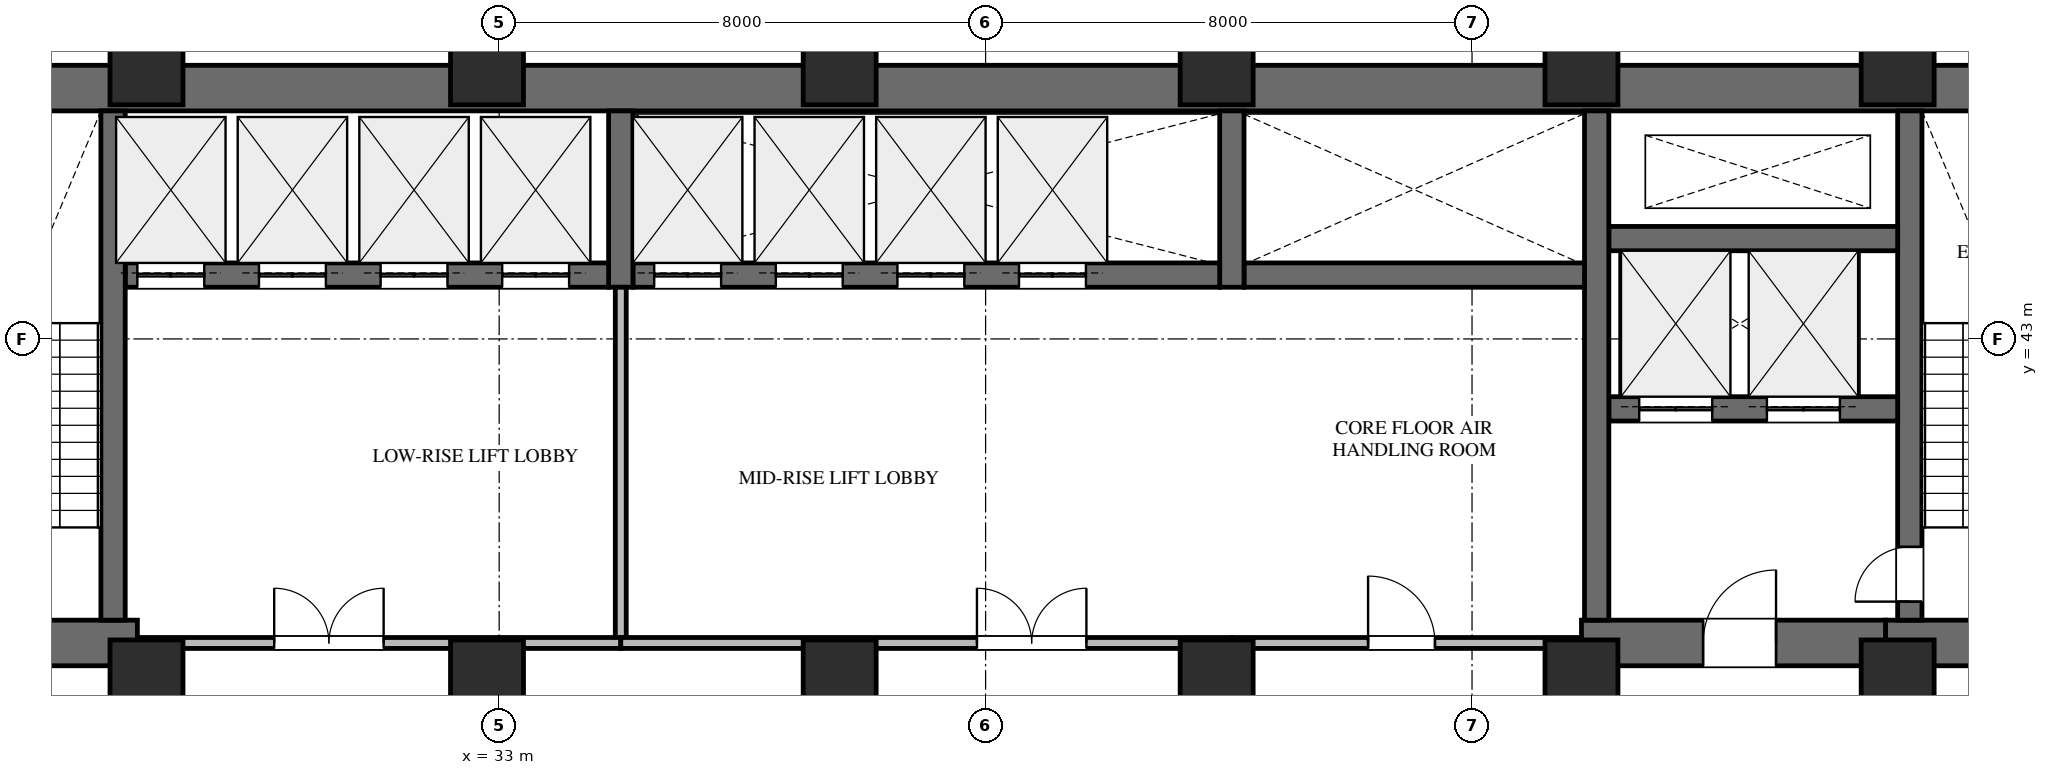
"""IFC4 building model, lengths in metres.
Left out: names, types, materials, properties, quantities, classifications, styles, units other than length and angle.
Written with IfcOpenShell. Run it as: python <this file> out.ifc"""

import sys

from ifc_helpers import new_model, si_unit, direction, frame, frame_2d, origin, origin_2d, place, context, subcontext, project, spatial, rectangle, extrude, element, fill, save


model = new_model("IFC4")
c1 = context("Model", 3, precision=1e-05, world=origin(), true_north=direction((0.0, 1.0)))
c2 = subcontext(c1, "Body", "Model", "MODEL_VIEW")
j1 = project(units=[si_unit("LENGTHUNIT", "METRE"), si_unit("PLANEANGLEUNIT", "RADIAN")], contexts=[c1])
p1 = place(None, origin())
s1 = spatial("IfcSite", under=j1, at=p1, CompositionType="ELEMENT")
p2 = place(p1, origin())
s2 = spatial("IfcBuilding", under=s1, at=p2, CompositionType="ELEMENT")
p3 = place(p2, frame((0.0, 0.0, 91.5)))
s3 = spatial("IfcBuildingStorey", under=s2, at=p3, CompositionType="ELEMENT", Elevation=91.5)
p4 = place(p3, frame((22.9, 47.125, 0.0), z_axis=(0.0, 0.0, 1.0), x_axis=(1.0, 0.0, 0.0)))
e1 = element("IfcWall", 1, at=p4, inside=s3, PredefinedType="SHEAR", context=c2, shape_type="SweptSolid", body=[
    extrude(rectangle(XDim=43.7, YDim=0.75, at=frame_2d((21.85, 0.0))), origin(), (0.0, 0.0, 1.0), 4.5),
])
p5 = place(p3, frame((55.8, 38.0, 0.0), z_axis=(0.0, 0.0, 1.0), x_axis=(1.0, 0.0, 0.0)))
e2 = element("IfcWall", 2, at=p5, inside=s3, PredefinedType="SHEAR", context=c2, shape_type="SweptSolid", body=[
    extrude(rectangle(XDim=10.8, YDim=0.75, at=frame_2d((5.4, 0.0))), origin(), (0.0, 0.0, 1.0), 4.5),
])
p6 = place(p5, frame((1.5, 0.0, 0.0)))
e3 = element("IfcOpeningElement", 3, at=p6, cuts=e2, PredefinedType="OPENING", context=c2, shape_type="SweptSolid", body=[
    extrude(rectangle(XDim=1.1, YDim=2.2, at=frame_2d((0.55, 1.1))), frame((0.0, 0.385, 0.0), z_axis=(0.0, -1.0, 0.0), x_axis=(1.0, 0.0, 0.0)), (0.0, 0.0, 1.0), 0.77),
])
p7 = place(p5, frame((4.82, 0.0, 0.0)))
e4 = element("IfcOpeningElement", 4, at=p7, cuts=e2, PredefinedType="OPENING", context=c2, shape_type="SweptSolid", body=[
    extrude(rectangle(XDim=1.0, YDim=2.15, at=frame_2d((0.5, 1.075))), frame((0.0, 0.385, 0.0), z_axis=(0.0, -1.0, 0.0), x_axis=(1.0, 0.0, 0.0)), (0.0, 0.0, 1.0), 0.77),
])
p8 = place(p5, frame((8.05, 0.0, 0.0)))
e5 = element("IfcOpeningElement", 5, at=p8, cuts=e2, PredefinedType="OPENING", context=c2, shape_type="SweptSolid", body=[
    extrude(rectangle(XDim=1.1, YDim=2.2, at=frame_2d((0.55, 1.1))), frame((0.0, 0.385, 0.0), z_axis=(0.0, -1.0, 0.0), x_axis=(1.0, 0.0, 0.0)), (0.0, 0.0, 1.0), 0.77),
])
p9 = place(p3, frame((56.2, 38.375, 0.0), z_axis=(0.0, 0.0, 1.0), x_axis=(0.0, 1.0, 0.0)))
e6 = element("IfcWall", 6, at=p9, inside=s3, PredefinedType="SHEAR", context=c2, shape_type="SweptSolid", body=[
    extrude(rectangle(XDim=8.375, YDim=0.4, at=frame_2d((4.188, 0.0))), origin(), (0.0, 0.0, 1.0), 4.5),
])
p10 = place(p9, frame((0.305, 0.0, 0.0)))
e7 = element("IfcOpeningElement", 7, at=p10, cuts=e6, PredefinedType="OPENING", context=c2, shape_type="SweptSolid", body=[
    extrude(rectangle(XDim=0.9, YDim=2.15, at=frame_2d((0.45, 1.075))), frame((0.0, 0.21, 0.0), z_axis=(0.0, -1.0, 0.0), x_axis=(1.0, 0.0, 0.0)), (0.0, 0.0, 1.0), 0.42),
])
p11 = place(p3, frame((50.8, 38.0, 0.0), z_axis=(0.0, 0.0, 1.0), x_axis=(1.0, 0.0, 0.0)))
e8 = element("IfcWall", 8, at=p11, inside=s3, PredefinedType="SHEAR", context=c2, shape_type="SweptSolid", body=[
    extrude(rectangle(XDim=5.0, YDim=0.75, at=frame_2d((2.5, 0.0))), origin(), (0.0, 0.0, 1.0), 4.5),
])
p12 = place(p11, frame((2.0, 0.0, 0.0)))
e9 = element("IfcOpeningElement", 9, at=p12, cuts=e8, PredefinedType="OPENING", context=c2, shape_type="SweptSolid", body=[
    extrude(rectangle(XDim=1.2, YDim=2.2, at=frame_2d((0.6, 1.1))), frame((0.0, 0.385, 0.0), z_axis=(0.0, -1.0, 0.0), x_axis=(1.0, 0.0, 0.0)), (0.0, 0.0, 1.0), 0.77),
])
p13 = place(p3, frame((51.25, 41.85, 0.0), z_axis=(0.0, 0.0, 1.0), x_axis=(1.0, 0.0, 0.0)))
e10 = element("IfcWall", 10, at=p13, inside=s3, PredefinedType="SHEAR", context=c2, shape_type="SweptSolid", body=[
    extrude(rectangle(XDim=4.75, YDim=0.4, at=frame_2d((2.375, 0.0))), origin(), (0.0, 0.0, 1.0), 4.5),
])
p14 = place(p13, frame((0.5, 0.0, 0.0)))
e11 = element("IfcOpeningElement", 11, at=p14, cuts=e10, PredefinedType="OPENING", context=c2, shape_type="SweptSolid", body=[
    extrude(rectangle(XDim=1.2, YDim=2.2, at=frame_2d((0.6, 1.1))), frame((0.0, 0.21, 0.0), z_axis=(0.0, -1.0, 0.0), x_axis=(1.0, 0.0, 0.0)), (0.0, 0.0, 1.0), 0.42),
])
p15 = place(p13, frame((2.6, 0.0, 0.0)))
e12 = element("IfcOpeningElement", 12, at=p15, cuts=e10, PredefinedType="OPENING", context=c2, shape_type="SweptSolid", body=[
    extrude(rectangle(XDim=1.2, YDim=2.2, at=frame_2d((0.6, 1.1))), frame((0.0, 0.21, 0.0), z_axis=(0.0, -1.0, 0.0), x_axis=(1.0, 0.0, 0.0)), (0.0, 0.0, 1.0), 0.42),
])
p16 = place(p3, frame((51.25, 44.65, 0.0), z_axis=(0.0, 0.0, 1.0), x_axis=(1.0, 0.0, 0.0)))
e13 = element("IfcWall", 13, at=p16, inside=s3, PredefinedType="SHEAR", context=c2, shape_type="SweptSolid", body=[
    extrude(rectangle(XDim=4.75, YDim=0.4, at=frame_2d((2.375, 0.0))), origin(), (0.0, 0.0, 1.0), 4.5),
])
p17 = place(p3, frame((51.05, 38.375, 0.0), z_axis=(0.0, 0.0, 1.0), x_axis=(0.0, 1.0, 0.0)))
e14 = element("IfcWall", 14, at=p17, inside=s3, PredefinedType="SHEAR", context=c2, shape_type="SweptSolid", body=[
    extrude(rectangle(XDim=8.375, YDim=0.4, at=frame_2d((4.188, 0.0))), origin(), (0.0, 0.0, 1.0), 4.5),
])
p18 = place(p3, frame((45.25, 44.05, 0.0), z_axis=(0.0, 0.0, 1.0), x_axis=(1.0, 0.0, 0.0)))
e15 = element("IfcWall", 15, at=p18, inside=s3, PredefinedType="SHEAR", context=c2, shape_type="SweptSolid", body=[
    extrude(rectangle(XDim=5.6, YDim=0.4, at=frame_2d((2.8, 0.0))), origin(), (0.0, 0.0, 1.0), 4.5),
])
p19 = place(p3, frame((45.05, 43.85, 0.0), z_axis=(0.0, 0.0, 1.0), x_axis=(0.0, 1.0, 0.0)))
e16 = element("IfcWall", 16, at=p19, inside=s3, PredefinedType="SHEAR", context=c2, shape_type="SweptSolid", body=[
    extrude(rectangle(XDim=2.9, YDim=0.4, at=frame_2d((1.45, 0.0))), origin(), (0.0, 0.0, 1.0), 4.5),
])
p20 = place(p3, frame((35.2, 44.05, 0.0), z_axis=(0.0, 0.0, 1.0), x_axis=(1.0, 0.0, 0.0)))
e17 = element("IfcWall", 17, at=p20, inside=s3, PredefinedType="SHEAR", context=c2, shape_type="SweptSolid", body=[
    extrude(rectangle(XDim=9.65, YDim=0.4, at=frame_2d((4.825, 0.0))), origin(), (0.0, 0.0, 1.0), 4.5),
])
p21 = place(p20, frame((0.35, 0.0, 0.0)))
e18 = element("IfcOpeningElement", 18, at=p21, cuts=e17, PredefinedType="OPENING", context=c2, shape_type="SweptSolid", body=[
    extrude(rectangle(XDim=1.1, YDim=2.2, at=frame_2d((0.55, 1.1))), frame((0.0, 0.21, 0.0), z_axis=(0.0, -1.0, 0.0), x_axis=(1.0, 0.0, 0.0)), (0.0, 0.0, 1.0), 0.42),
])
p22 = place(p20, frame((2.35, 0.0, 0.0)))
e19 = element("IfcOpeningElement", 19, at=p22, cuts=e17, PredefinedType="OPENING", context=c2, shape_type="SweptSolid", body=[
    extrude(rectangle(XDim=1.1, YDim=2.2, at=frame_2d((0.55, 1.1))), frame((0.0, 0.21, 0.0), z_axis=(0.0, -1.0, 0.0), x_axis=(1.0, 0.0, 0.0)), (0.0, 0.0, 1.0), 0.42),
])
p23 = place(p20, frame((4.35, 0.0, 0.0)))
e20 = element("IfcOpeningElement", 20, at=p23, cuts=e17, PredefinedType="OPENING", context=c2, shape_type="SweptSolid", body=[
    extrude(rectangle(XDim=1.1, YDim=2.2, at=frame_2d((0.55, 1.1))), frame((0.0, 0.21, 0.0), z_axis=(0.0, -1.0, 0.0), x_axis=(1.0, 0.0, 0.0)), (0.0, 0.0, 1.0), 0.42),
])
p24 = place(p20, frame((6.35, 0.0, 0.0)))
e21 = element("IfcOpeningElement", 21, at=p24, cuts=e17, PredefinedType="OPENING", context=c2, shape_type="SweptSolid", body=[
    extrude(rectangle(XDim=1.1, YDim=2.2, at=frame_2d((0.55, 1.1))), frame((0.0, 0.21, 0.0), z_axis=(0.0, -1.0, 0.0), x_axis=(1.0, 0.0, 0.0)), (0.0, 0.0, 1.0), 0.42),
])
p25 = place(p3, frame((35.0, 43.85, 0.0), z_axis=(0.0, 0.0, 1.0), x_axis=(0.0, 1.0, 0.0)))
e22 = element("IfcWall", 22, at=p25, inside=s3, PredefinedType="SHEAR", context=c2, shape_type="SweptSolid", body=[
    extrude(rectangle(XDim=2.9, YDim=0.4, at=frame_2d((1.45, 0.0))), origin(), (0.0, 0.0, 1.0), 4.5),
])
p26 = place(p3, frame((26.85, 44.05, 0.0), z_axis=(0.0, 0.0, 1.0), x_axis=(1.0, 0.0, 0.0)))
e23 = element("IfcWall", 23, at=p26, inside=s3, PredefinedType="SHEAR", context=c2, shape_type="SweptSolid", body=[
    extrude(rectangle(XDim=7.95, YDim=0.4, at=frame_2d((3.975, 0.0))), origin(), (0.0, 0.0, 1.0), 4.5),
])
p27 = place(p26, frame((0.2, 0.0, 0.0)))
e24 = element("IfcOpeningElement", 24, at=p27, cuts=e23, PredefinedType="OPENING", context=c2, shape_type="SweptSolid", body=[
    extrude(rectangle(XDim=1.1, YDim=2.2, at=frame_2d((0.55, 1.1))), frame((0.0, 0.21, 0.0), z_axis=(0.0, -1.0, 0.0), x_axis=(1.0, 0.0, 0.0)), (0.0, 0.0, 1.0), 0.42),
])
p28 = place(p26, frame((2.2, 0.0, 0.0)))
e25 = element("IfcOpeningElement", 25, at=p28, cuts=e23, PredefinedType="OPENING", context=c2, shape_type="SweptSolid", body=[
    extrude(rectangle(XDim=1.1, YDim=2.2, at=frame_2d((0.55, 1.1))), frame((0.0, 0.21, 0.0), z_axis=(0.0, -1.0, 0.0), x_axis=(1.0, 0.0, 0.0)), (0.0, 0.0, 1.0), 0.42),
])
p29 = place(p26, frame((4.2, 0.0, 0.0)))
e26 = element("IfcOpeningElement", 26, at=p29, cuts=e23, PredefinedType="OPENING", context=c2, shape_type="SweptSolid", body=[
    extrude(rectangle(XDim=1.1, YDim=2.2, at=frame_2d((0.55, 1.1))), frame((0.0, 0.21, 0.0), z_axis=(0.0, -1.0, 0.0), x_axis=(1.0, 0.0, 0.0)), (0.0, 0.0, 1.0), 0.42),
])
p30 = place(p26, frame((6.2, 0.0, 0.0)))
e27 = element("IfcOpeningElement", 27, at=p30, cuts=e23, PredefinedType="OPENING", context=c2, shape_type="SweptSolid", body=[
    extrude(rectangle(XDim=1.1, YDim=2.2, at=frame_2d((0.55, 1.1))), frame((0.0, 0.21, 0.0), z_axis=(0.0, -1.0, 0.0), x_axis=(1.0, 0.0, 0.0)), (0.0, 0.0, 1.0), 0.42),
])
p31 = place(p3, frame((22.85, 38.0, 0.0), z_axis=(0.0, 0.0, 1.0), x_axis=(1.0, 0.0, 0.0)))
e28 = element("IfcWall", 28, at=p31, inside=s3, PredefinedType="SHEAR", context=c2, shape_type="SweptSolid", body=[
    extrude(rectangle(XDim=4.2, YDim=0.75, at=frame_2d((2.1, 0.0))), origin(), (0.0, 0.0, 1.0), 4.5),
])
p32 = place(p31, frame((1.6, 0.0, 0.0)))
e29 = element("IfcOpeningElement", 29, at=p32, cuts=e28, PredefinedType="OPENING", context=c2, shape_type="SweptSolid", body=[
    extrude(rectangle(XDim=1.1, YDim=2.2, at=frame_2d((0.55, 1.1))), frame((0.0, 0.385, 0.0), z_axis=(0.0, -1.0, 0.0), x_axis=(1.0, 0.0, 0.0)), (0.0, 0.0, 1.0), 0.77),
])
p33 = place(p3, frame((26.65, 38.375, 0.0), z_axis=(0.0, 0.0, 1.0), x_axis=(0.0, 1.0, 0.0)))
e30 = element("IfcWall", 30, at=p33, inside=s3, PredefinedType="SHEAR", context=c2, shape_type="SweptSolid", body=[
    extrude(rectangle(XDim=8.375, YDim=0.4, at=frame_2d((4.188, 0.0))), origin(), (0.0, 0.0, 1.0), 4.5),
])
for number, where, z_axis, x_axis in (
    (31, (56.0, 47.55, 0.0), (0.0, 0.0, 1.0), (1.0, 0.0, 0.0)),
    (32, (56.0, 37.35, 0.0), (0.0, 0.0, 1.0), (1.0, 0.0, 0.0)),
    (33, (50.8, 47.55, 0.0), (0.0, 0.0, 1.0), (1.0, 0.0, 0.0)),
    (34, (50.8, 37.35, 0.0), (0.0, 0.0, 1.0), (1.0, 0.0, 0.0)),
    (35, (44.8, 37.35, 0.0), (0.0, 0.0, 1.0), (1.0, 0.0, 0.0)),
    (36, (44.8, 47.55, 0.0), (0.0, 0.0, 1.0), (1.0, 0.0, 0.0)),
    (37, (38.6, 37.35, 0.0), (0.0, 0.0, 1.0), (1.0, 0.0, 0.0)),
    (38, (38.6, 47.55, 0.0), (0.0, 0.0, 1.0), (1.0, 0.0, 0.0)),
    (39, (32.8, 37.35, 0.0), (0.0, 0.0, 1.0), (1.0, 0.0, 0.0)),
    (40, (32.8, 47.55, 0.0), (0.0, 0.0, 1.0), (1.0, 0.0, 0.0)),
    (41, (27.2, 37.35, 0.0), (0.0, 0.0, 1.0), (1.0, 0.0, 0.0)),
    (42, (27.2, 47.55, 0.0), (0.0, 0.0, 1.0), (1.0, 0.0, 0.0)),
):
    element("IfcColumn", number, at=place(p3, frame(where, z_axis=z_axis, x_axis=x_axis)), inside=s3, PredefinedType="COLUMN", context=c2, shape_type="SweptSolid", body=[
        extrude(rectangle(XDim=1.2, YDim=1.4, at=origin_2d()), origin(), (0.0, 0.0, 1.0), 4.5),
    ])
p34 = place(p3, frame((45.05, 38.0, 0.0), z_axis=(0.0, 0.0, 1.0), x_axis=(1.0, 0.0, 0.0)))
e43 = element("IfcWall", 43, at=p34, inside=s3, PredefinedType="STANDARD", context=c2, shape_type="SweptSolid", body=[
    extrude(rectangle(XDim=5.75, YDim=0.18, at=frame_2d((2.875, 0.0))), origin(), (0.0, 0.0, 1.0), 3.323),
])
p35 = place(p34, frame((2.24, 0.0, 0.0)))
e44 = element("IfcOpeningElement", 44, at=p35, cuts=e43, PredefinedType="OPENING", context=c2, shape_type="SweptSolid", body=[
    extrude(rectangle(XDim=1.1, YDim=2.2, at=frame_2d((0.55, 1.1))), frame((0.0, 0.1, 0.0), z_axis=(0.0, -1.0, 0.0), x_axis=(1.0, 0.0, 0.0)), (0.0, 0.0, 1.0), 0.2),
])
p36 = place(p3, frame((35.0, 38.0, 0.0), z_axis=(0.0, 0.0, 1.0), x_axis=(0.0, 1.0, 0.0)))
e45 = element("IfcWall", 45, at=p36, inside=s3, PredefinedType="STANDARD", context=c2, shape_type="SweptSolid", body=[
    extrude(rectangle(XDim=5.85, YDim=0.18, at=frame_2d((2.925, 0.0))), origin(), (0.0, 0.0, 1.0), 4.25),
])
p37 = place(p3, frame((27.05, 38.0, 0.0), z_axis=(0.0, 0.0, 1.0), x_axis=(1.0, 0.0, 0.0)))
e46 = element("IfcWall", 46, at=p37, inside=s3, PredefinedType="STANDARD", context=c2, shape_type="SweptSolid", body=[
    extrude(rectangle(XDim=7.95, YDim=0.18, at=frame_2d((3.975, 0.0))), origin(), (0.0, 0.0, 1.0), 3.323),
])
p38 = place(p37, frame((2.25, 0.0, 0.0)))
e47 = element("IfcOpeningElement", 47, at=p38, cuts=e46, PredefinedType="OPENING", context=c2, shape_type="SweptSolid", body=[
    extrude(rectangle(XDim=1.8, YDim=2.2, at=frame_2d((0.9, 1.1))), frame((0.0, 0.1, 0.0), z_axis=(0.0, -1.0, 0.0), x_axis=(1.0, 0.0, 0.0)), (0.0, 0.0, 1.0), 0.2),
])
p39 = place(p3, frame((35.0, 38.0, 0.0), z_axis=(0.0, 0.0, 1.0), x_axis=(1.0, 0.0, 0.0)))
e48 = element("IfcWall", 48, at=p39, inside=s3, PredefinedType="STANDARD", context=c2, shape_type="SweptSolid", body=[
    extrude(rectangle(XDim=10.05, YDim=0.18, at=frame_2d((5.025, 0.0))), origin(), (0.0, 0.0, 1.0), 3.323),
])
p40 = place(p39, frame((5.858, 0.0, 0.0)))
e49 = element("IfcOpeningElement", 49, at=p40, cuts=e48, PredefinedType="OPENING", context=c2, shape_type="SweptSolid", body=[
    extrude(rectangle(XDim=1.8, YDim=2.2, at=frame_2d((0.9, 1.1))), frame((0.0, 0.1, 0.0), z_axis=(0.0, -1.0, 0.0), x_axis=(1.0, 0.0, 0.0)), (0.0, 0.0, 1.0), 0.2),
])
p41 = place(p12, origin())
e50 = element("IfcDoor", 50, at=p41, inside=s3, OperationType="SINGLE_SWING_RIGHT", PredefinedType="DOOR", context=c2, shape_type="SweptSolid", body=[
    extrude(rectangle(XDim=1.2, YDim=2.2, at=frame_2d((0.6, 1.1))), frame((0.0, 0.025, 0.0), z_axis=(0.0, -1.0, 0.0), x_axis=(1.0, 0.0, 0.0)), (0.0, 0.0, 1.0), 0.05),
])
fill(e9, e50)
p42 = place(p10, origin())
e51 = element("IfcDoor", 51, at=p42, inside=s3, OperationType="SINGLE_SWING_LEFT", PredefinedType="DOOR", context=c2, shape_type="SweptSolid", body=[
    extrude(rectangle(XDim=0.9, YDim=2.15, at=frame_2d((0.45, 1.075))), frame((0.0, 0.025, 0.0), z_axis=(0.0, -1.0, 0.0), x_axis=(1.0, 0.0, 0.0)), (0.0, 0.0, 1.0), 0.05),
])
fill(e7, e51)
p43 = place(p27, origin())
e52 = element("IfcDoor", 52, at=p43, inside=s3, OperationType="DOUBLE_DOOR_SLIDING", PredefinedType="DOOR", context=c2, shape_type="SweptSolid", body=[
    extrude(rectangle(XDim=1.1, YDim=2.2, at=frame_2d((0.55, 1.1))), frame((0.0, 0.025, 0.0), z_axis=(0.0, -1.0, 0.0), x_axis=(1.0, 0.0, 0.0)), (0.0, 0.0, 1.0), 0.05),
])
fill(e24, e52)
p44 = place(p28, origin())
e53 = element("IfcDoor", 53, at=p44, inside=s3, OperationType="DOUBLE_DOOR_SLIDING", PredefinedType="DOOR", context=c2, shape_type="SweptSolid", body=[
    extrude(rectangle(XDim=1.1, YDim=2.2, at=frame_2d((0.55, 1.1))), frame((0.0, 0.025, 0.0), z_axis=(0.0, -1.0, 0.0), x_axis=(1.0, 0.0, 0.0)), (0.0, 0.0, 1.0), 0.05),
])
fill(e25, e53)
p45 = place(p29, origin())
e54 = element("IfcDoor", 54, at=p45, inside=s3, OperationType="DOUBLE_DOOR_SLIDING", PredefinedType="DOOR", context=c2, shape_type="SweptSolid", body=[
    extrude(rectangle(XDim=1.1, YDim=2.2, at=frame_2d((0.55, 1.1))), frame((0.0, 0.025, 0.0), z_axis=(0.0, -1.0, 0.0), x_axis=(1.0, 0.0, 0.0)), (0.0, 0.0, 1.0), 0.05),
])
fill(e26, e54)
p46 = place(p30, origin())
e55 = element("IfcDoor", 55, at=p46, inside=s3, OperationType="DOUBLE_DOOR_SLIDING", PredefinedType="DOOR", context=c2, shape_type="SweptSolid", body=[
    extrude(rectangle(XDim=1.1, YDim=2.2, at=frame_2d((0.55, 1.1))), frame((0.0, 0.025, 0.0), z_axis=(0.0, -1.0, 0.0), x_axis=(1.0, 0.0, 0.0)), (0.0, 0.0, 1.0), 0.05),
])
fill(e27, e55)
p47 = place(p21, origin())
e56 = element("IfcDoor", 56, at=p47, inside=s3, OperationType="DOUBLE_DOOR_SLIDING", PredefinedType="DOOR", context=c2, shape_type="SweptSolid", body=[
    extrude(rectangle(XDim=1.1, YDim=2.2, at=frame_2d((0.55, 1.1))), frame((0.0, 0.025, 0.0), z_axis=(0.0, -1.0, 0.0), x_axis=(1.0, 0.0, 0.0)), (0.0, 0.0, 1.0), 0.05),
])
fill(e18, e56)
p48 = place(p22, origin())
e57 = element("IfcDoor", 57, at=p48, inside=s3, OperationType="DOUBLE_DOOR_SLIDING", PredefinedType="DOOR", context=c2, shape_type="SweptSolid", body=[
    extrude(rectangle(XDim=1.1, YDim=2.2, at=frame_2d((0.55, 1.1))), frame((0.0, 0.025, 0.0), z_axis=(0.0, -1.0, 0.0), x_axis=(1.0, 0.0, 0.0)), (0.0, 0.0, 1.0), 0.05),
])
fill(e19, e57)
p49 = place(p23, origin())
e58 = element("IfcDoor", 58, at=p49, inside=s3, OperationType="DOUBLE_DOOR_SLIDING", PredefinedType="DOOR", context=c2, shape_type="SweptSolid", body=[
    extrude(rectangle(XDim=1.1, YDim=2.2, at=frame_2d((0.55, 1.1))), frame((0.0, 0.025, 0.0), z_axis=(0.0, -1.0, 0.0), x_axis=(1.0, 0.0, 0.0)), (0.0, 0.0, 1.0), 0.05),
])
fill(e20, e58)
p50 = place(p24, origin())
e59 = element("IfcDoor", 59, at=p50, inside=s3, OperationType="DOUBLE_DOOR_SLIDING", PredefinedType="DOOR", context=c2, shape_type="SweptSolid", body=[
    extrude(rectangle(XDim=1.1, YDim=2.2, at=frame_2d((0.55, 1.1))), frame((0.0, 0.025, 0.0), z_axis=(0.0, -1.0, 0.0), x_axis=(1.0, 0.0, 0.0)), (0.0, 0.0, 1.0), 0.05),
])
fill(e21, e59)
p51 = place(p14, origin())
e60 = element("IfcDoor", 60, at=p51, inside=s3, OperationType="DOUBLE_DOOR_SLIDING", PredefinedType="DOOR", context=c2, shape_type="SweptSolid", body=[
    extrude(rectangle(XDim=1.2, YDim=2.2, at=frame_2d((0.6, 1.1))), frame((0.0, 0.025, 0.0), z_axis=(0.0, -1.0, 0.0), x_axis=(1.0, 0.0, 0.0)), (0.0, 0.0, 1.0), 0.05),
])
fill(e11, e60)
p52 = place(p15, origin())
e61 = element("IfcDoor", 61, at=p52, inside=s3, OperationType="DOUBLE_DOOR_SLIDING", PredefinedType="DOOR", context=c2, shape_type="SweptSolid", body=[
    extrude(rectangle(XDim=1.2, YDim=2.2, at=frame_2d((0.6, 1.1))), frame((0.0, 0.025, 0.0), z_axis=(0.0, -1.0, 0.0), x_axis=(1.0, 0.0, 0.0)), (0.0, 0.0, 1.0), 0.05),
])
fill(e12, e61)
p53 = place(p35, origin())
e62 = element("IfcDoor", 62, at=p53, inside=s3, OperationType="SINGLE_SWING_LEFT", PredefinedType="DOOR", context=c2, shape_type="SweptSolid", body=[
    extrude(rectangle(XDim=1.1, YDim=2.2, at=frame_2d((0.55, 1.1))), frame((0.0, 0.025, 0.0), z_axis=(0.0, -1.0, 0.0), x_axis=(1.0, 0.0, 0.0)), (0.0, 0.0, 1.0), 0.05),
])
fill(e44, e62)
p54 = place(p38, origin())
e63 = element("IfcDoor", 63, at=p54, inside=s3, OperationType="DOUBLE_DOOR_SINGLE_SWING", PredefinedType="DOOR", context=c2, shape_type="SweptSolid", body=[
    extrude(rectangle(XDim=1.8, YDim=2.2, at=frame_2d((0.9, 1.1))), frame((0.0, 0.025, 0.0), z_axis=(0.0, -1.0, 0.0), x_axis=(1.0, 0.0, 0.0)), (0.0, 0.0, 1.0), 0.05),
])
fill(e47, e63)
p55 = place(p40, origin())
e64 = element("IfcDoor", 64, at=p55, inside=s3, OperationType="DOUBLE_DOOR_SINGLE_SWING", PredefinedType="DOOR", context=c2, shape_type="SweptSolid", body=[
    extrude(rectangle(XDim=1.8, YDim=2.2, at=frame_2d((0.9, 1.1))), frame((0.0, 0.025, 0.0), z_axis=(0.0, -1.0, 0.0), x_axis=(1.0, 0.0, 0.0)), (0.0, 0.0, 1.0), 0.05),
])
fill(e49, e64)
save(model, sys.argv[1])
